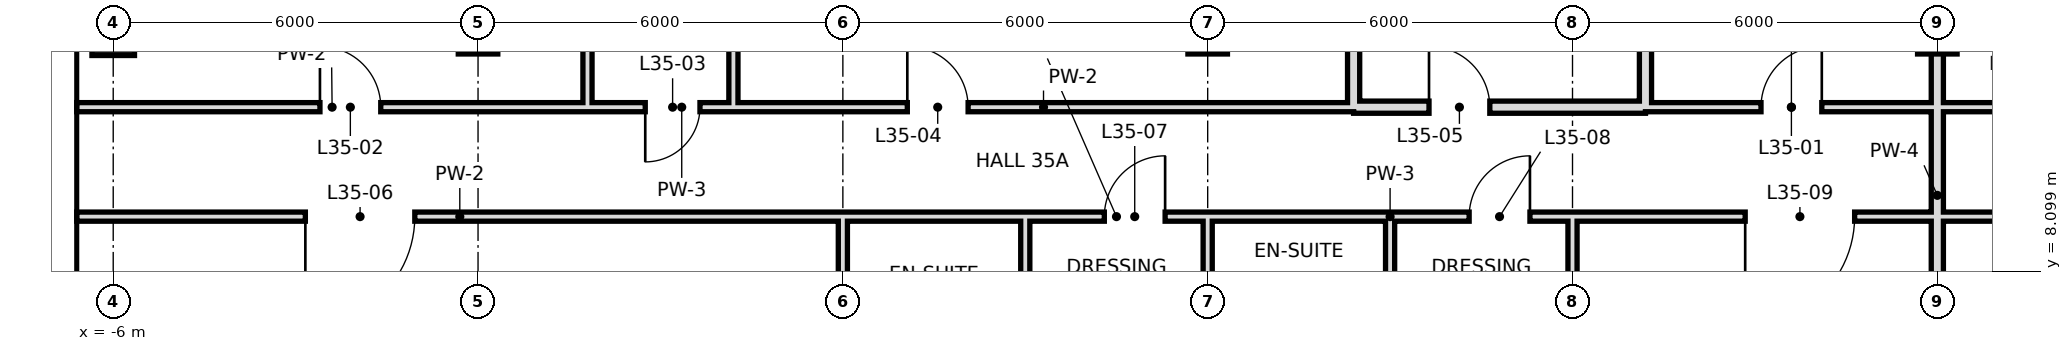
"""IFC4 building model, lengths in metres.
Left out: names, types, materials, properties, quantities, classifications, styles, units other than length and angle.
Written with IfcOpenShell. Run it as: python <this file> out.ifc"""

import sys

from ifc_helpers import new_model, si_unit, direction, frame, frame_2d, origin, origin_2d, place, context, subcontext, project, spatial, rectangle, hollow_rectangle, extrude, element, fill, save


model = new_model("IFC4")
c1 = context("Model", 3, precision=1e-05, world=origin(), true_north=direction((0.0, 1.0)))
c2 = subcontext(c1, "Body", "Model", "MODEL_VIEW")
j1 = project(units=[si_unit("LENGTHUNIT", "METRE"), si_unit("PLANEANGLEUNIT", "RADIAN")], contexts=[c1])
p1 = place(None, origin())
s1 = spatial("IfcSite", under=j1, at=p1, CompositionType="ELEMENT")
p2 = place(p1, origin())
s2 = spatial("IfcBuilding", under=s1, at=p2, CompositionType="ELEMENT")
p3 = place(p2, frame((0.0, 0.0, 154.6)))
s3 = spatial("IfcBuildingStorey", under=s2, at=p3, CompositionType="ELEMENT", Elevation=154.6)
p4 = place(p3, frame((-6.0, 12.0, 0.0), z_axis=(0.0, 0.0, 1.0), x_axis=(1.0, 0.0, 0.0)))
e1 = element("IfcColumn", 1, at=p4, inside=s3, PredefinedType="COLUMN", context=c2, shape_type="SweptSolid", body=[
    extrude(hollow_rectangle(XDim=0.7, YDim=0.7, WallThickness=0.036, at=origin_2d()), origin(), (0.0, 0.0, 1.0), 3.6),
])
for number, where, z_axis, x_axis in (
    (2, (0.0, 12.0, 0.0), (0.0, 0.0, 1.0), (1.0, 0.0, 0.0)),
    (3, (12.0, 12.0, 0.0), (0.0, 0.0, 1.0), (1.0, 0.0, 0.0)),
    (4, (24.0, 12.0, 0.0), (0.0, 0.0, 1.0), (1.0, 0.0, 0.0)),
):
    element("IfcColumn", number, at=place(p3, frame(where, z_axis=z_axis, x_axis=x_axis)), inside=s3, PredefinedType="COLUMN", context=c2, shape_type="SweptSolid", body=[
        extrude(hollow_rectangle(XDim=0.65, YDim=0.65, WallThickness=0.032, at=origin_2d()), origin(), (0.0, 0.0, 1.0), 3.6),
    ])
p5 = place(p3, frame((1.8, 10.8, 0.0), z_axis=(0.0, 0.0, 1.0), x_axis=(0.0, 1.0, 0.0)))
e5 = element("IfcWall", 5, at=p5, inside=s3, PredefinedType="PARTITIONING", context=c2, shape_type="SweptSolid", body=[
    extrude(rectangle(XDim=7.2, YDim=0.15, at=frame_2d((3.6, 0.0))), origin(), (0.0, 0.0, 1.0), 3.42),
])
p6 = place(p3, frame((12.0, 6.0, 0.0), z_axis=(0.0, 0.0, 1.0), x_axis=(0.0, 1.0, 0.0)))
e6 = element("IfcWall", 6, at=p6, inside=s3, PredefinedType="PARTITIONING", context=c2, shape_type="SweptSolid", body=[
    extrude(rectangle(XDim=3.0, YDim=0.15, at=frame_2d((1.5, 0.0))), origin(), (0.0, 0.0, 1.0), 2.72),
])
p7 = place(p3, frame((14.4, 10.8, 0.0), z_axis=(0.0, 0.0, 1.0), x_axis=(0.0, 1.0, 0.0)))
e7 = element("IfcWall", 7, at=p7, inside=s3, PredefinedType="SOLIDWALL", context=c2, shape_type="SweptSolid", body=[
    extrude(rectangle(XDim=7.9, YDim=0.2, at=frame_2d((3.95, 0.0))), origin(), (0.0, 0.0, 1.0), 2.72),
])
p8 = place(p3, frame((15.0, 6.0, 0.0), z_axis=(0.0, 0.0, 1.0), x_axis=(0.0, 1.0, 0.0)))
e8 = element("IfcWall", 8, at=p8, inside=s3, PredefinedType="PARTITIONING", context=c2, shape_type="SweptSolid", body=[
    extrude(rectangle(XDim=3.0, YDim=0.15, at=frame_2d((1.5, 0.0))), origin(), (0.0, 0.0, 1.0), 3.42),
])
p9 = place(p3, frame((18.0, -0.6, 0.0), z_axis=(0.0, 0.0, 1.0), x_axis=(0.0, 1.0, 0.0)))
e9 = element("IfcWall", 9, at=p9, inside=s3, PredefinedType="PARTITIONING", context=c2, shape_type="SweptSolid", body=[
    extrude(rectangle(XDim=9.6, YDim=0.15, at=frame_2d((4.8, 0.0))), origin(), (0.0, 0.0, 1.0), 2.72),
])
p10 = place(p3, frame((19.2, 10.8, 0.0), z_axis=(0.0, 0.0, 1.0), x_axis=(0.0, 1.0, 0.0)))
e10 = element("IfcWall", 10, at=p10, inside=s3, PredefinedType="SOLIDWALL", context=c2, shape_type="SweptSolid", body=[
    extrude(rectangle(XDim=7.9, YDim=0.2, at=frame_2d((3.95, 0.0))), origin(), (0.0, 0.0, 1.0), 2.72),
])
p11 = place(p3, frame((24.0, 0.0, 0.0), z_axis=(0.0, 0.0, 1.0), x_axis=(0.0, 1.0, 0.0)))
e11 = element("IfcWall", 11, at=p11, inside=s3, PredefinedType="SOLIDWALL", context=c2, shape_type="SweptSolid", body=[
    extrude(rectangle(XDim=18.7, YDim=0.2, at=frame_2d((9.35, 0.0))), origin(), (0.0, 0.0, 1.0), 2.72),
])
p12 = place(p3, frame((4.2, 10.8, 0.0), z_axis=(0.0, 0.0, 1.0), x_axis=(0.0, 1.0, 0.0)))
e12 = element("IfcWall", 12, at=p12, inside=s3, PredefinedType="PARTITIONING", context=c2, shape_type="SweptSolid", body=[
    extrude(rectangle(XDim=7.9, YDim=0.15, at=frame_2d((3.95, 0.0))), origin(), (0.0, 0.0, 1.0), 3.42),
])
p13 = place(p3, frame((6.0, 6.0, 0.0), z_axis=(0.0, 0.0, 1.0), x_axis=(0.0, 1.0, 0.0)))
e13 = element("IfcWall", 13, at=p13, inside=s3, PredefinedType="PARTITIONING", context=c2, shape_type="SweptSolid", body=[
    extrude(rectangle(XDim=3.0, YDim=0.15, at=frame_2d((1.5, 0.0))), origin(), (0.0, 0.0, 1.0), 2.72),
])
p14 = place(p3, frame((9.0, 6.0, 0.0), z_axis=(0.0, 0.0, 1.0), x_axis=(0.0, 1.0, 0.0)))
e14 = element("IfcWall", 14, at=p14, inside=s3, PredefinedType="PARTITIONING", context=c2, shape_type="SweptSolid", body=[
    extrude(rectangle(XDim=3.0, YDim=0.15, at=frame_2d((1.5, 0.0))), origin(), (0.0, 0.0, 1.0), 3.42),
])
p15 = place(p3, frame((14.4, 10.8, 0.0), z_axis=(0.0, 0.0, 1.0), x_axis=(1.0, 0.0, 0.0)))
e15 = element("IfcWall", 15, at=p15, inside=s3, PredefinedType="SOLIDWALL", context=c2, shape_type="SweptSolid", body=[
    extrude(rectangle(XDim=4.8, YDim=0.2, at=frame_2d((2.4, 0.0))), origin(), (0.0, 0.0, 1.0), 2.72),
])
p16 = place(p15, frame((1.24, 0.0, 0.0)))
e16 = element("IfcOpeningElement", 16, at=p16, cuts=e15, PredefinedType="OPENING", context=c2, shape_type="SweptSolid", body=[
    extrude(rectangle(XDim=1.0, YDim=2.4, at=frame_2d((0.5, 1.2))), frame((0.0, 0.11, 0.0), z_axis=(0.0, -1.0, 0.0), x_axis=(1.0, 0.0, 0.0)), (0.0, 0.0, 1.0), 0.22),
])
p17 = place(p3, frame((-6.6, 10.8, 0.0), z_axis=(0.0, 0.0, 1.0), x_axis=(1.0, 0.0, 0.0)))
e17 = element("IfcWall", 17, at=p17, inside=s3, PredefinedType="PARTITIONING", context=c2, shape_type="SweptSolid", body=[
    extrude(rectangle(XDim=8.4, YDim=0.15, at=frame_2d((4.2, 0.0))), origin(), (0.0, 0.0, 1.0), 3.42),
])
p18 = place(p17, frame((4.0, 0.0, 0.0)))
e18 = element("IfcOpeningElement", 18, at=p18, cuts=e17, PredefinedType="OPENING", context=c2, shape_type="SweptSolid", body=[
    extrude(rectangle(XDim=1.0, YDim=2.4, at=frame_2d((0.5, 1.2))), frame((0.0, 0.085, 0.0), z_axis=(0.0, -1.0, 0.0), x_axis=(1.0, 0.0, 0.0)), (0.0, 0.0, 1.0), 0.17),
])
p19 = place(p3, frame((4.2, 10.8, 0.0), z_axis=(0.0, 0.0, 1.0), x_axis=(1.0, 0.0, 0.0)))
e19 = element("IfcWall", 19, at=p19, inside=s3, PredefinedType="PARTITIONING", context=c2, shape_type="SweptSolid", body=[
    extrude(rectangle(XDim=10.2, YDim=0.15, at=frame_2d((5.1, 0.0))), origin(), (0.0, 0.0, 1.0), 3.42),
])
p20 = place(p19, frame((2.86, 0.0, 0.0)))
e20 = element("IfcOpeningElement", 20, at=p20, cuts=e19, PredefinedType="OPENING", context=c2, shape_type="SweptSolid", body=[
    extrude(rectangle(XDim=1.0, YDim=2.4, at=frame_2d((0.5, 1.2))), frame((0.0, 0.085, 0.0), z_axis=(0.0, -1.0, 0.0), x_axis=(1.0, 0.0, 0.0)), (0.0, 0.0, 1.0), 0.17),
])
p21 = place(p3, frame((19.2, 10.8, 0.0), z_axis=(0.0, 0.0, 1.0), x_axis=(1.0, 0.0, 0.0)))
e21 = element("IfcWall", 21, at=p21, inside=s3, PredefinedType="PARTITIONING", context=c2, shape_type="SweptSolid", body=[
    extrude(rectangle(XDim=4.8, YDim=0.15, at=frame_2d((2.4, 0.0))), origin(), (0.0, 0.0, 1.0), 3.42),
])
p22 = place(p21, frame((1.9, 0.0, 0.0)))
e22 = element("IfcOpeningElement", 22, at=p22, cuts=e21, PredefinedType="OPENING", context=c2, shape_type="SweptSolid", body=[
    extrude(rectangle(XDim=1.0, YDim=2.4, at=frame_2d((0.5, 1.2))), frame((0.0, 0.085, 0.0), z_axis=(0.0, -1.0, 0.0), x_axis=(1.0, 0.0, 0.0)), (0.0, 0.0, 1.0), 0.17),
])
p23 = place(p3, frame((1.8, 10.8, 0.0), z_axis=(0.0, 0.0, 1.0), x_axis=(1.0, 0.0, 0.0)))
e23 = element("IfcWall", 23, at=p23, inside=s3, PredefinedType="PARTITIONING", context=c2, shape_type="SweptSolid", body=[
    extrude(rectangle(XDim=2.4, YDim=0.15, at=frame_2d((1.2, 0.0))), origin(), (0.0, 0.0, 1.0), 3.42),
])
p24 = place(p23, frame((0.95, 0.0, 0.0)))
e24 = element("IfcOpeningElement", 24, at=p24, cuts=e23, PredefinedType="OPENING", context=c2, shape_type="SweptSolid", body=[
    extrude(rectangle(XDim=0.9, YDim=2.4, at=frame_2d((0.45, 1.2))), frame((0.0, 0.085, 0.0), z_axis=(0.0, -1.0, 0.0), x_axis=(1.0, 0.0, 0.0)), (0.0, 0.0, 1.0), 0.17),
])
p25 = place(p3, frame((24.0, 10.8, 0.0), z_axis=(0.0, 0.0, 1.0), x_axis=(1.0, 0.0, 0.0)))
e25 = element("IfcWall", 25, at=p25, inside=s3, PredefinedType="PARTITIONING", context=c2, shape_type="SweptSolid", body=[
    extrude(rectangle(XDim=2.4, YDim=0.15, at=frame_2d((1.2, 0.0))), origin(), (0.0, 0.0, 1.0), 3.42),
])
p26 = place(p25, frame((0.95, 0.0, 0.0)))
e26 = element("IfcOpeningElement", 26, at=p26, cuts=e25, PredefinedType="OPENING", context=c2, shape_type="SweptSolid", body=[
    extrude(rectangle(XDim=0.9, YDim=2.4, at=frame_2d((0.45, 1.2))), frame((0.0, 0.085, 0.0), z_axis=(0.0, -1.0, 0.0), x_axis=(1.0, 0.0, 0.0)), (0.0, 0.0, 1.0), 0.17),
])
p27 = place(p3, frame((-6.6, 9.0, 0.0), z_axis=(0.0, 0.0, 1.0), x_axis=(1.0, 0.0, 0.0)))
e27 = element("IfcWall", 27, at=p27, inside=s3, PredefinedType="PARTITIONING", context=c2, shape_type="SweptSolid", body=[
    extrude(rectangle(XDim=12.6, YDim=0.15, at=frame_2d((6.3, 0.0))), origin(), (0.0, 0.0, 1.0), 3.42),
])
p28 = place(p27, frame((3.76, 0.0, 0.0)))
e28 = element("IfcOpeningElement", 28, at=p28, cuts=e27, PredefinedType="OPENING", context=c2, shape_type="SweptSolid", body=[
    extrude(rectangle(XDim=1.8, YDim=2.4, at=frame_2d((0.9, 1.2))), frame((0.0, 0.085, 0.0), z_axis=(0.0, -1.0, 0.0), x_axis=(1.0, 0.0, 0.0)), (0.0, 0.0, 1.0), 0.17),
])
p29 = place(p3, frame((9.0, 9.0, 0.0), z_axis=(0.0, 0.0, 1.0), x_axis=(1.0, 0.0, 0.0)))
e29 = element("IfcWall", 29, at=p29, inside=s3, PredefinedType="PARTITIONING", context=c2, shape_type="SweptSolid", body=[
    extrude(rectangle(XDim=3.0, YDim=0.15, at=frame_2d((1.5, 0.0))), origin(), (0.0, 0.0, 1.0), 3.42),
])
p30 = place(p29, frame((1.3, 0.0, 0.0)))
e30 = element("IfcOpeningElement", 30, at=p30, cuts=e29, PredefinedType="OPENING", context=c2, shape_type="SweptSolid", body=[
    extrude(rectangle(XDim=1.0, YDim=2.4, at=frame_2d((0.5, 1.2))), frame((0.0, 0.085, 0.0), z_axis=(0.0, -1.0, 0.0), x_axis=(1.0, 0.0, 0.0)), (0.0, 0.0, 1.0), 0.17),
])
p31 = place(p3, frame((15.0, 9.0, 0.0), z_axis=(0.0, 0.0, 1.0), x_axis=(1.0, 0.0, 0.0)))
e31 = element("IfcWall", 31, at=p31, inside=s3, PredefinedType="PARTITIONING", context=c2, shape_type="SweptSolid", body=[
    extrude(rectangle(XDim=24.6, YDim=0.15, at=frame_2d((12.3, 0.0))), origin(), (0.0, 0.0, 1.0), 3.42),
])
p32 = place(p31, frame((1.3, 0.0, 0.0)))
e32 = element("IfcOpeningElement", 32, at=p32, cuts=e31, PredefinedType="OPENING", context=c2, shape_type="SweptSolid", body=[
    extrude(rectangle(XDim=1.0, YDim=2.4, at=frame_2d((0.5, 1.2))), frame((0.0, 0.085, 0.0), z_axis=(0.0, -1.0, 0.0), x_axis=(1.0, 0.0, 0.0)), (0.0, 0.0, 1.0), 0.17),
])
p33 = place(p31, frame((5.84, 0.0, 0.0)))
e33 = element("IfcOpeningElement", 33, at=p33, cuts=e31, PredefinedType="OPENING", context=c2, shape_type="SweptSolid", body=[
    extrude(rectangle(XDim=1.8, YDim=2.4, at=frame_2d((0.9, 1.2))), frame((0.0, 0.085, 0.0), z_axis=(0.0, -1.0, 0.0), x_axis=(1.0, 0.0, 0.0)), (0.0, 0.0, 1.0), 0.17),
])
p34 = place(p31, frame((10.6, 0.0, 0.0)))
e34 = element("IfcOpeningElement", 34, at=p34, cuts=e31, PredefinedType="OPENING", context=c2, shape_type="SweptSolid", body=[
    extrude(rectangle(XDim=1.0, YDim=2.4, at=frame_2d((0.5, 1.2))), frame((0.0, 0.085, 0.0), z_axis=(0.0, -1.0, 0.0), x_axis=(1.0, 0.0, 0.0)), (0.0, 0.0, 1.0), 0.17),
])
p35 = place(p31, frame((16.6, 0.0, 0.0)))
e35 = element("IfcOpeningElement", 35, at=p35, cuts=e31, PredefinedType="OPENING", context=c2, shape_type="SweptSolid", body=[
    extrude(rectangle(XDim=1.0, YDim=2.4, at=frame_2d((0.5, 1.2))), frame((0.0, 0.085, 0.0), z_axis=(0.0, -1.0, 0.0), x_axis=(1.0, 0.0, 0.0)), (0.0, 0.0, 1.0), 0.17),
])
p36 = place(p31, frame((22.72, 0.0, 0.0)))
e36 = element("IfcOpeningElement", 36, at=p36, cuts=e31, PredefinedType="OPENING", context=c2, shape_type="SweptSolid", body=[
    extrude(rectangle(XDim=1.0, YDim=2.4, at=frame_2d((0.5, 1.2))), frame((0.0, 0.085, 0.0), z_axis=(0.0, -1.0, 0.0), x_axis=(1.0, 0.0, 0.0)), (0.0, 0.0, 1.0), 0.17),
])
for number, where, z_axis, x_axis in (
    (37, (6.0, 9.0, 0.0), (0.0, 0.0, 1.0), (1.0, 0.0, 0.0)),
    (38, (12.0, 9.0, 0.0), (0.0, 0.0, 1.0), (1.0, 0.0, 0.0)),
):
    element("IfcWall", number, at=place(p3, frame(where, z_axis=z_axis, x_axis=x_axis)), inside=s3, PredefinedType="PARTITIONING", context=c2, shape_type="SweptSolid", body=[
        extrude(rectangle(XDim=3.0, YDim=0.15, at=frame_2d((1.5, 0.0))), origin(), (0.0, 0.0, 1.0), 3.42),
    ])
p37 = place(p22, frame((1.0, 0.0, 0.0), z_axis=(0.0, 0.0, 1.0), x_axis=(-1.0, 0.0, 0.0)))
e39 = element("IfcDoor", 39, at=p37, inside=s3, OperationType="SINGLE_SWING_LEFT", PredefinedType="DOOR", context=c2, shape_type="SweptSolid", body=[
    extrude(rectangle(XDim=1.0, YDim=2.4, at=frame_2d((0.5, 1.2))), frame((0.0, 0.025, 0.0), z_axis=(0.0, -1.0, 0.0), x_axis=(1.0, 0.0, 0.0)), (0.0, 0.0, 1.0), 0.05),
])
fill(e22, e39)
p38 = place(p18, origin())
e40 = element("IfcDoor", 40, at=p38, inside=s3, OperationType="SINGLE_SWING_LEFT", PredefinedType="DOOR", context=c2, shape_type="SweptSolid", body=[
    extrude(rectangle(XDim=1.0, YDim=2.4, at=frame_2d((0.5, 1.2))), frame((0.0, 0.025, 0.0), z_axis=(0.0, -1.0, 0.0), x_axis=(1.0, 0.0, 0.0)), (0.0, 0.0, 1.0), 0.05),
])
fill(e18, e40)
p39 = place(p24, frame((0.9, 0.0, 0.0), z_axis=(0.0, 0.0, 1.0), x_axis=(-1.0, 0.0, 0.0)))
e41 = element("IfcDoor", 41, at=p39, inside=s3, OperationType="SINGLE_SWING_RIGHT", PredefinedType="DOOR", context=c2, shape_type="SweptSolid", body=[
    extrude(rectangle(XDim=0.9, YDim=2.4, at=frame_2d((0.45, 1.2))), frame((0.0, 0.025, 0.0), z_axis=(0.0, -1.0, 0.0), x_axis=(1.0, 0.0, 0.0)), (0.0, 0.0, 1.0), 0.05),
])
fill(e24, e41)
p40 = place(p20, origin())
e42 = element("IfcDoor", 42, at=p40, inside=s3, OperationType="SINGLE_SWING_LEFT", PredefinedType="DOOR", context=c2, shape_type="SweptSolid", body=[
    extrude(rectangle(XDim=1.0, YDim=2.4, at=frame_2d((0.5, 1.2))), frame((0.0, 0.025, 0.0), z_axis=(0.0, -1.0, 0.0), x_axis=(1.0, 0.0, 0.0)), (0.0, 0.0, 1.0), 0.05),
])
fill(e20, e42)
p41 = place(p16, origin())
e43 = element("IfcDoor", 43, at=p41, inside=s3, OperationType="SINGLE_SWING_LEFT", PredefinedType="DOOR", context=c2, shape_type="SweptSolid", body=[
    extrude(rectangle(XDim=1.0, YDim=2.4, at=frame_2d((0.5, 1.2))), frame((0.0, 0.025, 0.0), z_axis=(0.0, -1.0, 0.0), x_axis=(1.0, 0.0, 0.0)), (0.0, 0.0, 1.0), 0.05),
])
fill(e16, e43)
p42 = place(p28, frame((1.8, 0.0, 0.0), z_axis=(0.0, 0.0, 1.0), x_axis=(-1.0, 0.0, 0.0)))
e44 = element("IfcDoor", 44, at=p42, inside=s3, OperationType="SINGLE_SWING_RIGHT", PredefinedType="DOOR", context=c2, shape_type="SweptSolid", body=[
    extrude(rectangle(XDim=1.8, YDim=2.4, at=frame_2d((0.9, 1.2))), frame((0.0, 0.025, 0.0), z_axis=(0.0, -1.0, 0.0), x_axis=(1.0, 0.0, 0.0)), (0.0, 0.0, 1.0), 0.05),
])
fill(e28, e44)
p43 = place(p30, frame((1.0, 0.0, 0.0), z_axis=(0.0, 0.0, 1.0), x_axis=(-1.0, 0.0, 0.0)))
e45 = element("IfcDoor", 45, at=p43, inside=s3, OperationType="SINGLE_SWING_LEFT", PredefinedType="DOOR", context=c2, shape_type="SweptSolid", body=[
    extrude(rectangle(XDim=1.0, YDim=2.4, at=frame_2d((0.5, 1.2))), frame((0.0, 0.025, 0.0), z_axis=(0.0, -1.0, 0.0), x_axis=(1.0, 0.0, 0.0)), (0.0, 0.0, 1.0), 0.05),
])
fill(e30, e45)
p44 = place(p32, frame((1.0, 0.0, 0.0), z_axis=(0.0, 0.0, 1.0), x_axis=(-1.0, 0.0, 0.0)))
e46 = element("IfcDoor", 46, at=p44, inside=s3, OperationType="SINGLE_SWING_LEFT", PredefinedType="DOOR", context=c2, shape_type="SweptSolid", body=[
    extrude(rectangle(XDim=1.0, YDim=2.4, at=frame_2d((0.5, 1.2))), frame((0.0, 0.025, 0.0), z_axis=(0.0, -1.0, 0.0), x_axis=(1.0, 0.0, 0.0)), (0.0, 0.0, 1.0), 0.05),
])
fill(e32, e46)
p45 = place(p33, frame((1.8, 0.0, 0.0), z_axis=(0.0, 0.0, 1.0), x_axis=(-1.0, 0.0, 0.0)))
e47 = element("IfcDoor", 47, at=p45, inside=s3, OperationType="SINGLE_SWING_RIGHT", PredefinedType="DOOR", context=c2, shape_type="SweptSolid", body=[
    extrude(rectangle(XDim=1.8, YDim=2.4, at=frame_2d((0.9, 1.2))), frame((0.0, 0.025, 0.0), z_axis=(0.0, -1.0, 0.0), x_axis=(1.0, 0.0, 0.0)), (0.0, 0.0, 1.0), 0.05),
])
fill(e33, e47)
save(model, sys.argv[1])
